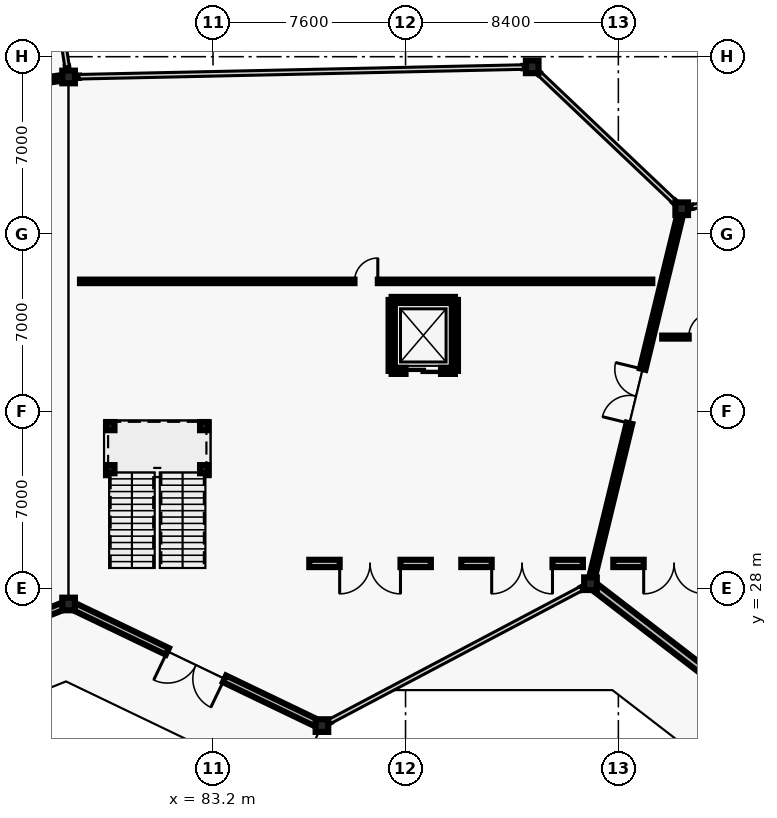
"""IFC4 building model, lengths in metres.
Left out: names, types, materials, properties, quantities, classifications, styles, units other than length and angle.
Written with IfcOpenShell. Run it as: python <this file> out.ifc"""

import sys

from ifc_helpers import new_model, si_unit, direction, frame, frame_2d, origin, origin_2d, place, context, subcontext, project, spatial, rectangle, hollow_circle, i_section, extrude, element, fill, save


model = new_model("IFC4")
c1 = context("Model", 3, precision=1e-05, world=origin(), true_north=direction((0.0, 1.0)))
c2 = subcontext(c1, "Body", "Model", "MODEL_VIEW")
j1 = project(units=[si_unit("LENGTHUNIT", "METRE"), si_unit("PLANEANGLEUNIT", "RADIAN")], contexts=[c1])
p1 = place(None, origin())
s1 = spatial("IfcSite", under=j1, at=p1, CompositionType="ELEMENT")
p2 = place(p1, origin())
s2 = spatial("IfcBuilding", under=s1, at=p2, CompositionType="ELEMENT")
p3 = place(p2, origin())
s3 = spatial("IfcBuildingStorey", under=s2, at=p3, CompositionType="ELEMENT", Elevation=0.0)
for number, where, z_axis, x_axis in (
    (1, (77.5, 27.4, 0.0), (0.0, 0.0, 1.0), (1.0, 0.0, 0.0)),
    (2, (77.5, 48.2, 0.0), (0.0, 0.0, 1.0), (1.0, 0.0, 0.0)),
    (3, (87.5, 22.6, 0.0), (0.0, 0.0, 1.0), (1.0, 0.0, 0.0)),
    (4, (95.8, 48.6, 0.0), (0.0, 0.0, 1.0), (1.0, 0.0, 0.0)),
    (5, (98.1, 28.2, 0.0), (0.0, 0.0, 1.0), (1.0, 0.0, 0.0)),
    (6, (101.7, 43.0, 0.0), (0.0, 0.0, 1.0), (1.0, 0.0, 0.0)),
):
    element("IfcColumn", number, at=place(p3, frame(where, z_axis=z_axis, x_axis=x_axis)), inside=s3, PredefinedType="COLUMN", context=c2, shape_type="SweptSolid", body=[
        extrude(i_section(OverallWidth=0.5, OverallDepth=0.5, WebThickness=0.022, FlangeThickness=0.036, at=origin_2d()), origin(), (0.0, 0.0, 1.0), 5.4),
    ])
p4 = place(p3, frame((77.444, 27.378, 0.0), z_axis=(0.0, 0.0, 1.0), x_axis=(-0.928469860605, -0.371407751599, 0.0)))
e7 = element("IfcWall", 7, at=p4, inside=s3, PredefinedType="SOLIDWALL", context=c2, shape_type="SweptSolid", body=[
    extrude(rectangle(XDim=12.326, YDim=0.29, at=frame_2d((6.163, 0.0))), origin(), (0.0, 0.0, 1.0), 4.22),
])
p5 = place(p4, frame((4.863, 0.0, 0.0)))
e8 = element("IfcOpeningElement", 8, at=p5, cuts=e7, PredefinedType="OPENING", context=c2, shape_type="SweptSolid", body=[
    extrude(rectangle(XDim=2.6, YDim=2.55, at=frame_2d((1.3, 1.275))), frame((0.0, 0.155, 0.0), z_axis=(0.0, -1.0, 0.0), x_axis=(1.0, 0.0, 0.0)), (0.0, 0.0, 1.0), 0.31),
])
p6 = place(p3, frame((87.5, 22.6, 0.0), z_axis=(0.0, 0.0, 1.0), x_axis=(-0.901529273173, 0.432718117961, 0.0)))
e9 = element("IfcWall", 9, at=p6, inside=s3, PredefinedType="SOLIDWALL", context=c2, shape_type="SweptSolid", body=[
    extrude(rectangle(XDim=11.032, YDim=0.29, at=frame_2d((5.516, 0.0))), origin(), (0.0, 0.0, 1.0), 4.22),
])
p7 = place(p6, frame((4.266, 0.0, 0.0)))
e10 = element("IfcOpeningElement", 10, at=p7, cuts=e9, PredefinedType="OPENING", context=c2, shape_type="SweptSolid", body=[
    extrude(rectangle(XDim=2.5, YDim=2.45, at=frame_2d((1.25, 1.225))), frame((0.0, 0.155, 0.0), z_axis=(0.0, -1.0, 0.0), x_axis=(1.0, 0.0, 0.0)), (0.0, 0.0, 1.0), 0.31),
])
p8 = place(p3, frame((98.01, 28.152, 0.0), z_axis=(0.0, 0.0, 1.0), x_axis=(-0.885021600209, -0.465549962049, 0.0)))
e11 = element("IfcWall", 11, at=p8, inside=s3, PredefinedType="SOLIDWALL", context=c2, shape_type="SweptSolid", body=[
    extrude(rectangle(XDim=0.307, YDim=0.095, at=frame_2d((0.154, 0.0))), origin(), (0.0, 0.0, 1.0), 4.22),
])
p9 = place(p3, frame((87.809, 22.763, 0.0), z_axis=(0.0, 0.0, 1.0), x_axis=(-0.885348834604, -0.464927350308, 0.0)))
e12 = element("IfcWall", 12, at=p9, inside=s3, PredefinedType="SOLIDWALL", context=c2, shape_type="SweptSolid", body=[
    extrude(rectangle(XDim=0.307, YDim=0.095, at=frame_2d((0.154, 0.0))), origin(), (0.0, 0.0, 1.0), 4.22),
])
for number, where, z_axis, x_axis in (
    (13, (95.83, 48.571, 0.0), (0.0, 0.0, 1.0), (0.726, -0.688, 0.0)),
    (14, (101.403, 43.282, 0.0), (0.0, 0.0, 1.0), (0.726, -0.687, 0.0)),
):
    element("IfcWall", number, at=place(p3, frame(where, z_axis=z_axis, x_axis=x_axis)), inside=s3, PredefinedType="SOLIDWALL", context=c2, shape_type="SweptSolid", body=[
        extrude(rectangle(XDim=0.308, YDim=0.095, at=frame_2d((0.154, 0.0))), origin(), (0.0, 0.0, 1.0), 4.22),
    ])
p10 = place(p3, frame((77.602, 48.202, 0.0), z_axis=(0.0, 0.0, 1.0), x_axis=(0.999735659566, 0.022991541735, 0.0)))
e15 = element("IfcWall", 15, at=p10, inside=s3, PredefinedType="SOLIDWALL", context=c2, shape_type="SweptSolid", body=[
    extrude(rectangle(XDim=0.308, YDim=0.095, at=frame_2d((0.154, 0.0))), origin(), (0.0, 0.0, 1.0), 4.22),
])
p11 = place(p3, frame((95.45, 48.592, 0.0), z_axis=(0.0, 0.0, 1.0), x_axis=(0.999736078158, 0.022973333016, 0.0)))
e16 = element("IfcWall", 16, at=p11, inside=s3, PredefinedType="SOLIDWALL", context=c2, shape_type="SweptSolid", body=[
    extrude(rectangle(XDim=0.308, YDim=0.095, at=frame_2d((0.154, 0.0))), origin(), (0.0, 0.0, 1.0), 4.22),
])
p12 = place(p3, frame((77.439, 48.605, 0.0), z_axis=(0.0, 0.0, 1.0), x_axis=(0.15008766182, -0.988672692942, 0.0)))
e17 = element("IfcWall", 17, at=p12, inside=s3, PredefinedType="SOLIDWALL", context=c2, shape_type="SweptSolid", body=[
    extrude(rectangle(XDim=0.307, YDim=0.095, at=frame_2d((0.154, 0.0))), origin(), (0.0, 0.0, 1.0), 4.22),
])
p13 = place(p3, frame((110.7, 18.5, 0.0), z_axis=(0.0, 0.0, 1.0), x_axis=(-0.792411961764, 0.609986297267, 0.0)))
e18 = element("IfcWall", 18, at=p13, inside=s3, PredefinedType="SOLIDWALL", context=c2, shape_type="SweptSolid", body=[
    extrude(rectangle(XDim=15.842, YDim=0.315, at=frame_2d((7.921, 0.0))), origin(), (0.0, 0.0, 1.0), 4.22),
])
p14 = place(p13, frame((6.62, 0.0, 0.0)))
e19 = element("IfcOpeningElement", 19, at=p14, cuts=e18, PredefinedType="OPENING", context=c2, shape_type="SweptSolid", body=[
    extrude(rectangle(XDim=2.6, YDim=2.55, at=frame_2d((1.3, 1.275))), frame((0.0, 0.167, 0.0), z_axis=(0.0, -1.0, 0.0), x_axis=(1.0, 0.0, 0.0)), (0.0, 0.0, 1.0), 0.335),
])
p15 = place(p3, frame((101.8, 43.019, 0.0), z_axis=(0.0, 0.0, 1.0), x_axis=(0.983958590936, 0.178397004803, 0.0)))
e20 = element("IfcWall", 20, at=p15, inside=s3, PredefinedType="SOLIDWALL", context=c2, shape_type="SweptSolid", body=[
    extrude(rectangle(XDim=0.308, YDim=0.095, at=frame_2d((0.154, 0.0))), origin(), (0.0, 0.0, 1.0), 4.22),
])
p16 = place(p3, frame((91.8, 29.0, 0.0), z_axis=(0.0, 0.0, 1.0), x_axis=(-1.0, 0.0, 0.0)))
e21 = element("IfcWall", 21, at=p16, inside=s3, PredefinedType="SOLIDWALL", context=c2, shape_type="SweptSolid", body=[
    extrude(rectangle(XDim=4.8, YDim=0.29, at=frame_2d((2.4, 0.0))), origin(), (0.0, 0.0, 1.0), 4.4),
])
p17 = place(p16, frame((1.2, 0.0, 0.0)))
e22 = element("IfcOpeningElement", 22, at=p17, cuts=e21, PredefinedType="OPENING", context=c2, shape_type="SweptSolid", body=[
    extrude(rectangle(XDim=2.4, YDim=2.55, at=frame_2d((1.2, 1.275))), frame((0.0, 0.155, 0.0), z_axis=(0.0, -1.0, 0.0), x_axis=(1.0, 0.0, 0.0)), (0.0, 0.0, 1.0), 0.31),
])
p18 = place(p3, frame((97.8, 29.0, 0.0), z_axis=(0.0, 0.0, 1.0), x_axis=(-1.0, 0.0, 0.0)))
e23 = element("IfcWall", 23, at=p18, inside=s3, PredefinedType="SOLIDWALL", context=c2, shape_type="SweptSolid", body=[
    extrude(rectangle(XDim=4.8, YDim=0.29, at=frame_2d((2.4, 0.0))), origin(), (0.0, 0.0, 1.0), 4.4),
])
p19 = place(p18, frame((1.2, 0.0, 0.0)))
e24 = element("IfcOpeningElement", 24, at=p19, cuts=e23, PredefinedType="OPENING", context=c2, shape_type="SweptSolid", body=[
    extrude(rectangle(XDim=2.4, YDim=2.55, at=frame_2d((1.2, 1.275))), frame((0.0, 0.155, 0.0), z_axis=(0.0, -1.0, 0.0), x_axis=(1.0, 0.0, 0.0)), (0.0, 0.0, 1.0), 0.31),
])
p20 = place(p3, frame((103.8, 29.0, 0.0), z_axis=(0.0, 0.0, 1.0), x_axis=(-1.0, 0.0, 0.0)))
e25 = element("IfcWall", 25, at=p20, inside=s3, PredefinedType="SOLIDWALL", context=c2, shape_type="SweptSolid", body=[
    extrude(rectangle(XDim=4.8, YDim=0.29, at=frame_2d((2.4, 0.0))), origin(), (0.0, 0.0, 1.0), 4.4),
])
p21 = place(p20, frame((1.2, 0.0, 0.0)))
e26 = element("IfcOpeningElement", 26, at=p21, cuts=e25, PredefinedType="OPENING", context=c2, shape_type="SweptSolid", body=[
    extrude(rectangle(XDim=2.4, YDim=2.55, at=frame_2d((1.2, 1.275))), frame((0.0, 0.155, 0.0), z_axis=(0.0, -1.0, 0.0), x_axis=(1.0, 0.0, 0.0)), (0.0, 0.0, 1.0), 0.31),
])
p22 = place(p3, frame((77.5, 48.2, 0.0), z_axis=(0.0, 0.0, 1.0), x_axis=(-0.990181159322, -0.139790098807, 0.0)))
e27 = element("IfcWall", 27, at=p22, inside=s3, PredefinedType="SOLIDWALL", context=c2, shape_type="SweptSolid", body=[
    extrude(rectangle(XDim=15.738, YDim=0.225, at=frame_2d((7.869, 0.0))), origin(), (0.0, 0.0, 1.0), 4.62),
])
p23 = place(p22, frame((6.769, 0.0, 0.0)))
e28 = element("IfcOpeningElement", 28, at=p23, cuts=e27, PredefinedType="OPENING", context=c2, shape_type="SweptSolid", body=[
    extrude(rectangle(XDim=2.2, YDim=2.6, at=frame_2d((1.1, 1.3))), frame((0.0, 0.123, 0.0), z_axis=(0.0, -1.0, 0.0), x_axis=(1.0, 0.0, 0.0)), (0.0, 0.0, 1.0), 0.245),
])
p24 = place(p3, frame((98.1, 28.2, 0.0), z_axis=(0.0, 0.0, 1.0), x_axis=(0.236341762997, 0.971669990822, 0.0)))
e29 = element("IfcWall", 29, at=p24, inside=s3, PredefinedType="SOLIDWALL", context=c2, shape_type="SweptSolid", body=[
    extrude(rectangle(XDim=15.231, YDim=0.225, at=frame_2d((7.616, 0.0))), origin(), (0.0, 0.0, 1.0), 4.62),
])
p25 = place(p24, frame((6.516, 0.0, 0.0)))
e30 = element("IfcOpeningElement", 30, at=p25, cuts=e29, PredefinedType="OPENING", context=c2, shape_type="SweptSolid", body=[
    extrude(rectangle(XDim=2.2, YDim=2.6, at=frame_2d((1.1, 1.3))), frame((0.0, 0.123, 0.0), z_axis=(0.0, -1.0, 0.0), x_axis=(1.0, 0.0, 0.0)), (0.0, 0.0, 1.0), 0.245),
])
p26 = place(p3, frame((77.95, 40.133, 0.0), z_axis=(0.0, 0.0, 1.0), x_axis=(1.0, 0.0, 0.0)))
e31 = element("IfcWall", 31, at=p26, inside=s3, PredefinedType="PARTITIONING", context=c2, shape_type="SweptSolid", body=[
    extrude(rectangle(XDim=22.59, YDim=0.14, at=frame_2d((11.295, 0.0))), origin(), (0.0, 0.0, 1.0), 3.92),
])
p27 = place(p26, frame((10.835, 0.0, 0.0)))
e32 = element("IfcOpeningElement", 32, at=p27, cuts=e31, PredefinedType="OPENING", context=c2, shape_type="SweptSolid", body=[
    extrude(rectangle(XDim=0.92, YDim=2.1, at=frame_2d((0.46, 1.05))), frame((0.0, 0.08, 0.0), z_axis=(0.0, -1.0, 0.0), x_axis=(1.0, 0.0, 0.0)), (0.0, 0.0, 1.0), 0.16),
])
p28 = place(p3, frame((100.931, 37.933, 0.0), z_axis=(0.0, 0.0, 1.0), x_axis=(1.0, 0.0, 0.0)))
e33 = element("IfcWall", 33, at=p28, inside=s3, PredefinedType="PARTITIONING", context=c2, shape_type="SweptSolid", body=[
    extrude(rectangle(XDim=3.069, YDim=0.12, at=frame_2d((1.535, 0.0))), origin(), (0.0, 0.0, 1.0), 3.92),
])
p29 = place(p28, frame((1.045, 0.0, 0.0)))
e34 = element("IfcOpeningElement", 34, at=p29, cuts=e33, PredefinedType="OPENING", context=c2, shape_type="SweptSolid", body=[
    extrude(rectangle(XDim=0.98, YDim=2.15, at=frame_2d((0.49, 1.075))), frame((0.0, 0.07, 0.0), z_axis=(0.0, -1.0, 0.0), x_axis=(1.0, 0.0, 0.0)), (0.0, 0.0, 1.0), 0.14),
])
for number, where, z_axis, x_axis in (
    (35, (79.15, 32.72, 0.0), (0.0, 0.0, 1.0), (1.0, 0.0, 0.0)),
    (36, (82.85, 32.72, 0.0), (0.0, 0.0, 1.0), (1.0, 0.0, 0.0)),
    (37, (79.15, 34.42, 0.0), (0.0, 0.0, 1.0), (1.0, 0.0, 0.0)),
    (38, (82.85, 34.42, 0.0), (0.0, 0.0, 1.0), (1.0, 0.0, 0.0)),
):
    element("IfcColumn", number, at=place(p3, frame(where, z_axis=z_axis, x_axis=x_axis)), inside=s3, PredefinedType="COLUMN", context=c2, shape_type="SweptSolid", body=[
        extrude(hollow_circle(Radius=0.162, WallThickness=0.01, at=origin_2d()), origin(), (0.0, 0.0, 1.0), 5.4),
    ])
p30 = place(p3, frame((90.25, 39.4, 0.0), z_axis=(0.0, 0.0, 1.0), x_axis=(1.0, 0.0, 0.0)))
e39 = element("IfcWall", 39, at=p30, inside=s3, PredefinedType="SHEAR", context=c2, shape_type="SweptSolid", body=[
    extrude(rectangle(XDim=2.5, YDim=0.24, at=frame_2d((1.25, 0.0))), origin(), (0.0, 0.0, 1.0), 5.16),
])
for number, where, z_axis, x_axis in (
    (40, (92.75, 39.4, 0.0), (0.0, 0.0, 1.0), (0.0, -1.0, 0.0)),
    (41, (90.25, 36.6, 0.0), (0.0, 0.0, 1.0), (0.0, 1.0, 0.0)),
):
    element("IfcWall", number, at=place(p3, frame(where, z_axis=z_axis, x_axis=x_axis)), inside=s3, PredefinedType="SHEAR", context=c2, shape_type="SweptSolid", body=[
        extrude(rectangle(XDim=2.8, YDim=0.24, at=frame_2d((1.4, 0.0))), origin(), (0.0, 0.0, 1.0), 5.16),
    ])
p31 = place(p3, frame((92.75, 36.6, 0.0), z_axis=(0.0, 0.0, 1.0), x_axis=(-1.0, 0.0, 0.0)))
e42 = element("IfcWall", 42, at=p31, inside=s3, PredefinedType="SHEAR", context=c2, shape_type="SweptSolid", body=[
    extrude(rectangle(XDim=2.5, YDim=0.24, at=frame_2d((1.25, 0.0))), origin(), (0.0, 0.0, 1.0), 5.16),
])
p32 = place(p31, frame((0.55, 0.0, 0.0)))
e43 = element("IfcOpeningElement", 43, at=p32, cuts=e42, PredefinedType="OPENING", context=c2, shape_type="SweptSolid", body=[
    extrude(rectangle(XDim=1.4, YDim=2.3, at=frame_2d((0.7, 1.15))), frame((0.0, 0.13, 0.0), z_axis=(0.0, -1.0, 0.0), x_axis=(1.0, 0.0, 0.0)), (0.0, 0.0, 1.0), 0.26),
])
p33 = place(p7, origin())
e44 = element("IfcDoor", 44, at=p33, inside=s3, OperationType="DOUBLE_DOOR_SINGLE_SWING", PredefinedType="DOOR", context=c2, shape_type="SweptSolid", body=[
    extrude(rectangle(XDim=2.5, YDim=2.45, at=frame_2d((1.25, 1.225))), frame((0.0, 0.025, 0.0), z_axis=(0.0, -1.0, 0.0), x_axis=(1.0, 0.0, 0.0)), (0.0, 0.0, 1.0), 0.05),
])
fill(e10, e44)
p34 = place(p17, origin())
e45 = element("IfcDoor", 45, at=p34, inside=s3, OperationType="DOUBLE_DOOR_SINGLE_SWING", PredefinedType="DOOR", context=c2, shape_type="SweptSolid", body=[
    extrude(rectangle(XDim=2.4, YDim=2.55, at=frame_2d((1.2, 1.275))), frame((0.0, 0.025, 0.0), z_axis=(0.0, -1.0, 0.0), x_axis=(1.0, 0.0, 0.0)), (0.0, 0.0, 1.0), 0.05),
])
fill(e22, e45)
p35 = place(p19, origin())
e46 = element("IfcDoor", 46, at=p35, inside=s3, OperationType="DOUBLE_DOOR_SINGLE_SWING", PredefinedType="DOOR", context=c2, shape_type="SweptSolid", body=[
    extrude(rectangle(XDim=2.4, YDim=2.55, at=frame_2d((1.2, 1.275))), frame((0.0, 0.025, 0.0), z_axis=(0.0, -1.0, 0.0), x_axis=(1.0, 0.0, 0.0)), (0.0, 0.0, 1.0), 0.05),
])
fill(e24, e46)
p36 = place(p21, origin())
e47 = element("IfcDoor", 47, at=p36, inside=s3, OperationType="DOUBLE_DOOR_SINGLE_SWING", PredefinedType="DOOR", context=c2, shape_type="SweptSolid", body=[
    extrude(rectangle(XDim=2.4, YDim=2.55, at=frame_2d((1.2, 1.275))), frame((0.0, 0.025, 0.0), z_axis=(0.0, -1.0, 0.0), x_axis=(1.0, 0.0, 0.0)), (0.0, 0.0, 1.0), 0.05),
])
fill(e26, e47)
p37 = place(p25, origin())
e48 = element("IfcDoor", 48, at=p37, inside=s3, OperationType="DOUBLE_DOOR_SINGLE_SWING", PredefinedType="DOOR", context=c2, shape_type="SweptSolid", body=[
    extrude(rectangle(XDim=2.2, YDim=2.6, at=frame_2d((1.1, 1.3))), frame((0.0, 0.025, 0.0), z_axis=(0.0, -1.0, 0.0), x_axis=(1.0, 0.0, 0.0)), (0.0, 0.0, 1.0), 0.05),
])
fill(e30, e48)
p38 = place(p27, origin())
e49 = element("IfcDoor", 49, at=p38, inside=s3, OperationType="SINGLE_SWING_RIGHT", PredefinedType="DOOR", context=c2, shape_type="SweptSolid", body=[
    extrude(rectangle(XDim=0.92, YDim=2.1, at=frame_2d((0.46, 1.05))), frame((0.0, 0.025, 0.0), z_axis=(0.0, -1.0, 0.0), x_axis=(1.0, 0.0, 0.0)), (0.0, 0.0, 1.0), 0.05),
])
fill(e32, e49)
p39 = place(p29, origin())
e50 = element("IfcDoor", 50, at=p39, inside=s3, OperationType="SINGLE_SWING_RIGHT", PredefinedType="DOOR", context=c2, shape_type="SweptSolid", body=[
    extrude(rectangle(XDim=0.98, YDim=2.15, at=frame_2d((0.49, 1.075))), frame((0.0, 0.025, 0.0), z_axis=(0.0, -1.0, 0.0), x_axis=(1.0, 0.0, 0.0)), (0.0, 0.0, 1.0), 0.05),
])
fill(e34, e50)
p40 = place(p32, origin())
e51 = element("IfcDoor", 51, at=p40, inside=s3, OperationType="SLIDING_TO_LEFT", PredefinedType="DOOR", context=c2, shape_type="SweptSolid", body=[
    extrude(rectangle(XDim=1.4, YDim=2.3, at=frame_2d((0.7, 1.15))), frame((0.0, 0.025, 0.0), z_axis=(0.0, -1.0, 0.0), x_axis=(1.0, 0.0, 0.0)), (0.0, 0.0, 1.0), 0.05),
])
fill(e43, e51)
save(model, sys.argv[1])
